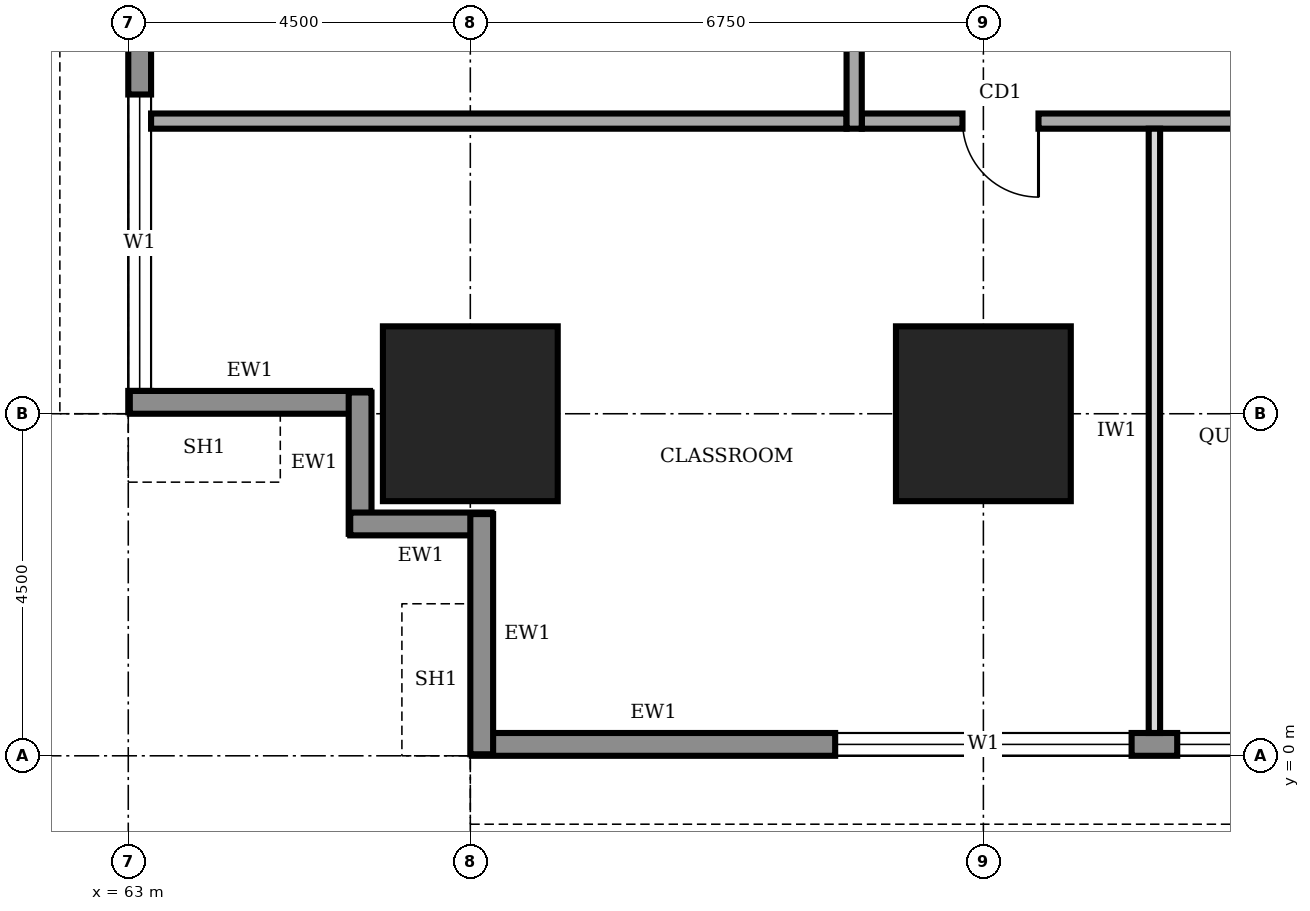
"""IFC4 building model, lengths in metres.
Left out: names, types, materials, properties, quantities, classifications, styles, units other than length and angle.
Written with IfcOpenShell. Run it as: python <this file> out.ifc"""

import sys

from ifc_helpers import new_model, si_unit, direction, frame, frame_2d, origin, origin_2d, place, context, subcontext, project, spatial, rectangle, extrude, element, fill, save


model = new_model("IFC4")
c1 = context("Model", 3, precision=1e-05, world=origin(), true_north=direction((0.0, 1.0)))
c2 = subcontext(c1, "Body", "Model", "MODEL_VIEW")
j1 = project(units=[si_unit("LENGTHUNIT", "METRE"), si_unit("PLANEANGLEUNIT", "RADIAN")], contexts=[c1])
p1 = place(None, origin())
s1 = spatial("IfcSite", under=j1, at=p1, CompositionType="ELEMENT")
p2 = place(p1, origin())
s2 = spatial("IfcBuilding", under=s1, at=p2, CompositionType="ELEMENT")
p3 = place(p2, frame((0.0, 0.0, 45.0)))
s3 = spatial("IfcBuildingStorey", under=s2, at=p3, CompositionType="ELEMENT", Elevation=45.0)
for number, where, z_axis, x_axis in (
    (1, (67.5, 4.5, 0.0), (0.0, 0.0, 1.0), (1.0, 0.0, 0.0)),
    (2, (74.25, 4.5, 0.0), (0.0, 0.0, 1.0), (1.0, 0.0, 0.0)),
):
    element("IfcColumn", number, at=place(p3, frame(where, z_axis=z_axis, x_axis=x_axis)), inside=s3, PredefinedType="COLUMN", context=c2, shape_type="SweptSolid", body=[
        extrude(rectangle(XDim=2.3, YDim=2.3, at=origin_2d()), origin(), (0.0, 0.0, 1.0), 4.0),
    ])
p4 = place(p3, frame((67.52, 0.15, 0.0), z_axis=(0.0, 0.0, 1.0), x_axis=(1.0, 0.0, 0.0)))
e3 = element("IfcWall", 3, at=p4, inside=s3, PredefinedType="STANDARD", context=c2, shape_type="SweptSolid", body=[
    extrude(rectangle(XDim=26.96, YDim=0.3, at=frame_2d((13.48, 0.0))), origin(), (0.0, 0.0, 1.0), 3.75),
])
p5 = place(p4, frame((4.78, 0.0, 0.9)))
e4 = element("IfcOpeningElement", 4, at=p5, cuts=e3, PredefinedType="OPENING", context=c2, shape_type="SweptSolid", body=[
    extrude(rectangle(XDim=3.9, YDim=2.2, at=frame_2d((1.95, 1.1))), frame((0.0, 0.16, 0.0), z_axis=(0.0, -1.0, 0.0), x_axis=(1.0, 0.0, 0.0)), (0.0, 0.0, 1.0), 0.32),
])
p6 = place(p4, frame((9.28, 0.0, 0.9)))
e5 = element("IfcOpeningElement", 5, at=p6, cuts=e3, PredefinedType="OPENING", context=c2, shape_type="SweptSolid", body=[
    extrude(rectangle(XDim=3.9, YDim=2.2, at=frame_2d((1.95, 1.1))), frame((0.0, 0.16, 0.0), z_axis=(0.0, -1.0, 0.0), x_axis=(1.0, 0.0, 0.0)), (0.0, 0.0, 1.0), 0.32),
])
p7 = place(p4, frame((13.78, 0.0, 0.9)))
e6 = element("IfcOpeningElement", 6, at=p7, cuts=e3, PredefinedType="OPENING", context=c2, shape_type="SweptSolid", body=[
    extrude(rectangle(XDim=3.9, YDim=2.2, at=frame_2d((1.95, 1.1))), frame((0.0, 0.16, 0.0), z_axis=(0.0, -1.0, 0.0), x_axis=(1.0, 0.0, 0.0)), (0.0, 0.0, 1.0), 0.32),
])
p8 = place(p4, frame((18.28, 0.0, 0.9)))
e7 = element("IfcOpeningElement", 7, at=p8, cuts=e3, PredefinedType="OPENING", context=c2, shape_type="SweptSolid", body=[
    extrude(rectangle(XDim=3.9, YDim=2.2, at=frame_2d((1.95, 1.1))), frame((0.0, 0.16, 0.0), z_axis=(0.0, -1.0, 0.0), x_axis=(1.0, 0.0, 0.0)), (0.0, 0.0, 1.0), 0.32),
])
p9 = place(p4, frame((22.78, 0.0, 0.9)))
e8 = element("IfcOpeningElement", 8, at=p9, cuts=e3, PredefinedType="OPENING", context=c2, shape_type="SweptSolid", body=[
    extrude(rectangle(XDim=3.9, YDim=2.2, at=frame_2d((1.95, 1.1))), frame((0.0, 0.16, 0.0), z_axis=(0.0, -1.0, 0.0), x_axis=(1.0, 0.0, 0.0)), (0.0, 0.0, 1.0), 0.32),
])
p10 = place(p3, frame((63.15, 35.98, 0.0), z_axis=(0.0, 0.0, 1.0), x_axis=(0.0, -1.0, 0.0)))
e9 = element("IfcWall", 9, at=p10, inside=s3, PredefinedType="STANDARD", context=c2, shape_type="SweptSolid", body=[
    extrude(rectangle(XDim=31.46, YDim=0.3, at=frame_2d((15.73, 0.0))), origin(), (0.0, 0.0, 1.0), 3.75),
])
p11 = place(p10, frame((27.28, 0.0, 0.9)))
e10 = element("IfcOpeningElement", 10, at=p11, cuts=e9, PredefinedType="OPENING", context=c2, shape_type="SweptSolid", body=[
    extrude(rectangle(XDim=3.9, YDim=2.2, at=frame_2d((1.95, 1.1))), frame((0.0, 0.16, 0.0), z_axis=(0.0, -1.0, 0.0), x_axis=(1.0, 0.0, 0.0)), (0.0, 0.0, 1.0), 0.32),
])
p12 = place(p10, frame((22.78, 0.0, 0.9)))
e11 = element("IfcOpeningElement", 11, at=p12, cuts=e9, PredefinedType="OPENING", context=c2, shape_type="SweptSolid", body=[
    extrude(rectangle(XDim=3.9, YDim=2.2, at=frame_2d((1.95, 1.1))), frame((0.0, 0.16, 0.0), z_axis=(0.0, -1.0, 0.0), x_axis=(1.0, 0.0, 0.0)), (0.0, 0.0, 1.0), 0.32),
])
p13 = place(p10, frame((18.28, 0.0, 0.9)))
e12 = element("IfcOpeningElement", 12, at=p13, cuts=e9, PredefinedType="OPENING", context=c2, shape_type="SweptSolid", body=[
    extrude(rectangle(XDim=3.9, YDim=2.2, at=frame_2d((1.95, 1.1))), frame((0.0, 0.16, 0.0), z_axis=(0.0, -1.0, 0.0), x_axis=(1.0, 0.0, 0.0)), (0.0, 0.0, 1.0), 0.32),
])
p14 = place(p10, frame((13.78, 0.0, 0.9)))
e13 = element("IfcOpeningElement", 13, at=p14, cuts=e9, PredefinedType="OPENING", context=c2, shape_type="SweptSolid", body=[
    extrude(rectangle(XDim=3.9, YDim=2.2, at=frame_2d((1.95, 1.1))), frame((0.0, 0.16, 0.0), z_axis=(0.0, -1.0, 0.0), x_axis=(1.0, 0.0, 0.0)), (0.0, 0.0, 1.0), 0.32),
])
p15 = place(p10, frame((9.28, 0.0, 0.9)))
e14 = element("IfcOpeningElement", 14, at=p15, cuts=e9, PredefinedType="OPENING", context=c2, shape_type="SweptSolid", body=[
    extrude(rectangle(XDim=3.9, YDim=2.2, at=frame_2d((1.95, 1.1))), frame((0.0, 0.16, 0.0), z_axis=(0.0, -1.0, 0.0), x_axis=(1.0, 0.0, 0.0)), (0.0, 0.0, 1.0), 0.32),
])
p16 = place(p10, frame((4.78, 0.0, 0.9)))
e15 = element("IfcOpeningElement", 15, at=p16, cuts=e9, PredefinedType="OPENING", context=c2, shape_type="SweptSolid", body=[
    extrude(rectangle(XDim=3.9, YDim=2.2, at=frame_2d((1.95, 1.1))), frame((0.0, 0.16, 0.0), z_axis=(0.0, -1.0, 0.0), x_axis=(1.0, 0.0, 0.0)), (0.0, 0.0, 1.0), 0.32),
])
p17 = place(p3, frame((63.02, 4.65, 0.0), z_axis=(0.0, 0.0, 1.0), x_axis=(1.0, 0.0, 0.0)))
e16 = element("IfcWall", 16, at=p17, inside=s3, PredefinedType="STANDARD", context=c2, shape_type="SweptSolid", body=[
    extrude(rectangle(XDim=3.16, YDim=0.3, at=frame_2d((1.58, 0.0))), origin(), (0.0, 0.0, 1.0), 2.85),
])
for number, where, z_axis, x_axis in (
    (17, (66.05, 4.78, 0.0), (0.0, 0.0, 1.0), (0.0, -1.0, 0.0)),
    (18, (65.92, 3.05, 0.0), (0.0, 0.0, 1.0), (1.0, 0.0, 0.0)),
):
    element("IfcWall", number, at=place(p3, frame(where, z_axis=z_axis, x_axis=x_axis)), inside=s3, PredefinedType="STANDARD", context=c2, shape_type="SweptSolid", body=[
        extrude(rectangle(XDim=1.86, YDim=0.3, at=frame_2d((0.93, 0.0))), origin(), (0.0, 0.0, 1.0), 3.75),
    ])
p18 = place(p3, frame((67.65, 3.18, 0.0), z_axis=(0.0, 0.0, 1.0), x_axis=(0.0, -1.0, 0.0)))
e19 = element("IfcWall", 19, at=p18, inside=s3, PredefinedType="STANDARD", context=c2, shape_type="SweptSolid", body=[
    extrude(rectangle(XDim=3.16, YDim=0.3, at=frame_2d((1.58, 0.0))), origin(), (0.0, 0.0, 1.0), 2.85),
])
p19 = place(p3, frame((72.65, 8.35, 0.0), z_axis=(0.0, 0.0, 1.0), x_axis=(1.0, 0.0, 0.0)))
e20 = element("IfcWall", 20, at=p19, inside=s3, PredefinedType="SOLIDWALL", context=c2, shape_type="SweptSolid", body=[
    extrude(rectangle(XDim=16.9, YDim=0.2, at=frame_2d((8.45, 0.0))), origin(), (0.0, 0.0, 1.0), 3.75),
])
p20 = place(p19, frame((1.325, 0.0, 0.0)))
e21 = element("IfcOpeningElement", 21, at=p20, cuts=e20, PredefinedType="OPENING", context=c2, shape_type="SweptSolid", body=[
    extrude(rectangle(XDim=1.0, YDim=2.1, at=frame_2d((0.5, 1.05))), frame((0.0, 0.11, 0.0), z_axis=(0.0, -1.0, 0.0), x_axis=(1.0, 0.0, 0.0)), (0.0, 0.0, 1.0), 0.22),
])
p21 = place(p19, frame((5.6, 0.0, 0.0)))
e22 = element("IfcOpeningElement", 22, at=p21, cuts=e20, PredefinedType="OPENING", context=c2, shape_type="SweptSolid", body=[
    extrude(rectangle(XDim=1.0, YDim=2.1, at=frame_2d((0.5, 1.05))), frame((0.0, 0.11, 0.0), z_axis=(0.0, -1.0, 0.0), x_axis=(1.0, 0.0, 0.0)), (0.0, 0.0, 1.0), 0.22),
])
p22 = place(p19, frame((11.925, 0.0, 0.0)))
e23 = element("IfcOpeningElement", 23, at=p22, cuts=e20, PredefinedType="OPENING", context=c2, shape_type="SweptSolid", body=[
    extrude(rectangle(XDim=1.4, YDim=2.1, at=frame_2d((0.7, 1.05))), frame((0.0, 0.11, 0.0), z_axis=(0.0, -1.0, 0.0), x_axis=(1.0, 0.0, 0.0)), (0.0, 0.0, 1.0), 0.22),
])
p23 = place(p3, frame((72.55, 32.05, 0.0), z_axis=(0.0, 0.0, 1.0), x_axis=(0.0, -1.0, 0.0)))
e24 = element("IfcWall", 24, at=p23, inside=s3, PredefinedType="SOLIDWALL", context=c2, shape_type="SweptSolid", body=[
    extrude(rectangle(XDim=23.8, YDim=0.2, at=frame_2d((11.9, 0.0))), origin(), (0.0, 0.0, 1.0), 3.75),
])
p24 = place(p23, frame((18.425, 0.0, 0.0)))
e25 = element("IfcOpeningElement", 25, at=p24, cuts=e24, PredefinedType="OPENING", context=c2, shape_type="SweptSolid", body=[
    extrude(rectangle(XDim=1.0, YDim=2.1, at=frame_2d((0.5, 1.05))), frame((0.0, 0.11, 0.0), z_axis=(0.0, -1.0, 0.0), x_axis=(1.0, 0.0, 0.0)), (0.0, 0.0, 1.0), 0.22),
])
p25 = place(p23, frame((6.225, 0.0, 0.0)))
e26 = element("IfcOpeningElement", 26, at=p25, cuts=e24, PredefinedType="OPENING", context=c2, shape_type="SweptSolid", body=[
    extrude(rectangle(XDim=1.4, YDim=2.1, at=frame_2d((0.7, 1.05))), frame((0.0, 0.11, 0.0), z_axis=(0.0, -1.0, 0.0), x_axis=(1.0, 0.0, 0.0)), (0.0, 0.0, 1.0), 0.22),
])
p26 = place(p3, frame((63.3, 8.35, 0.0), z_axis=(0.0, 0.0, 1.0), x_axis=(1.0, 0.0, 0.0)))
e27 = element("IfcWall", 27, at=p26, inside=s3, PredefinedType="SOLIDWALL", context=c2, shape_type="SweptSolid", body=[
    extrude(rectangle(XDim=9.15, YDim=0.2, at=frame_2d((4.575, 0.0))), origin(), (0.0, 0.0, 1.0), 3.75),
])
p27 = place(p3, frame((76.5, 0.3, 0.0), z_axis=(0.0, 0.0, 1.0), x_axis=(0.0, 1.0, 0.0)))
e28 = element("IfcWall", 28, at=p27, inside=s3, PredefinedType="PARTITIONING", context=c2, shape_type="SweptSolid", body=[
    extrude(rectangle(XDim=7.95, YDim=0.15, at=frame_2d((3.975, 0.0))), origin(), (0.0, 0.0, 1.0), 3.75),
])
p28 = place(p5, origin())
e29 = element("IfcWindow", 29, at=p28, inside=s3, PartitioningType="SINGLE_PANEL", PredefinedType="WINDOW", context=c2, shape_type="SweptSolid", body=[
    extrude(rectangle(XDim=3.9, YDim=2.2, at=frame_2d((1.95, 1.1))), frame((0.0, 0.03, 0.0), z_axis=(0.0, -1.0, 0.0), x_axis=(1.0, 0.0, 0.0)), (0.0, 0.0, 1.0), 0.06),
])
fill(e4, e29)
p29 = place(p6, origin())
e30 = element("IfcWindow", 30, at=p29, inside=s3, PartitioningType="SINGLE_PANEL", PredefinedType="WINDOW", context=c2, shape_type="SweptSolid", body=[
    extrude(rectangle(XDim=3.9, YDim=2.2, at=frame_2d((1.95, 1.1))), frame((0.0, 0.03, 0.0), z_axis=(0.0, -1.0, 0.0), x_axis=(1.0, 0.0, 0.0)), (0.0, 0.0, 1.0), 0.06),
])
fill(e5, e30)
p30 = place(p11, origin())
e31 = element("IfcWindow", 31, at=p30, inside=s3, PartitioningType="SINGLE_PANEL", PredefinedType="WINDOW", context=c2, shape_type="SweptSolid", body=[
    extrude(rectangle(XDim=3.9, YDim=2.2, at=frame_2d((1.95, 1.1))), frame((0.0, 0.03, 0.0), z_axis=(0.0, -1.0, 0.0), x_axis=(1.0, 0.0, 0.0)), (0.0, 0.0, 1.0), 0.06),
])
fill(e10, e31)
p31 = place(p20, frame((1.0, 0.0, 0.0), z_axis=(0.0, 0.0, 1.0), x_axis=(-1.0, 0.0, 0.0)))
e32 = element("IfcDoor", 32, at=p31, inside=s3, OperationType="SINGLE_SWING_LEFT", PredefinedType="DOOR", context=c2, shape_type="SweptSolid", body=[
    extrude(rectangle(XDim=1.0, YDim=2.1, at=frame_2d((0.5, 1.05))), frame((0.0, 0.025, 0.0), z_axis=(0.0, -1.0, 0.0), x_axis=(1.0, 0.0, 0.0)), (0.0, 0.0, 1.0), 0.05),
])
fill(e21, e32)
save(model, sys.argv[1])
